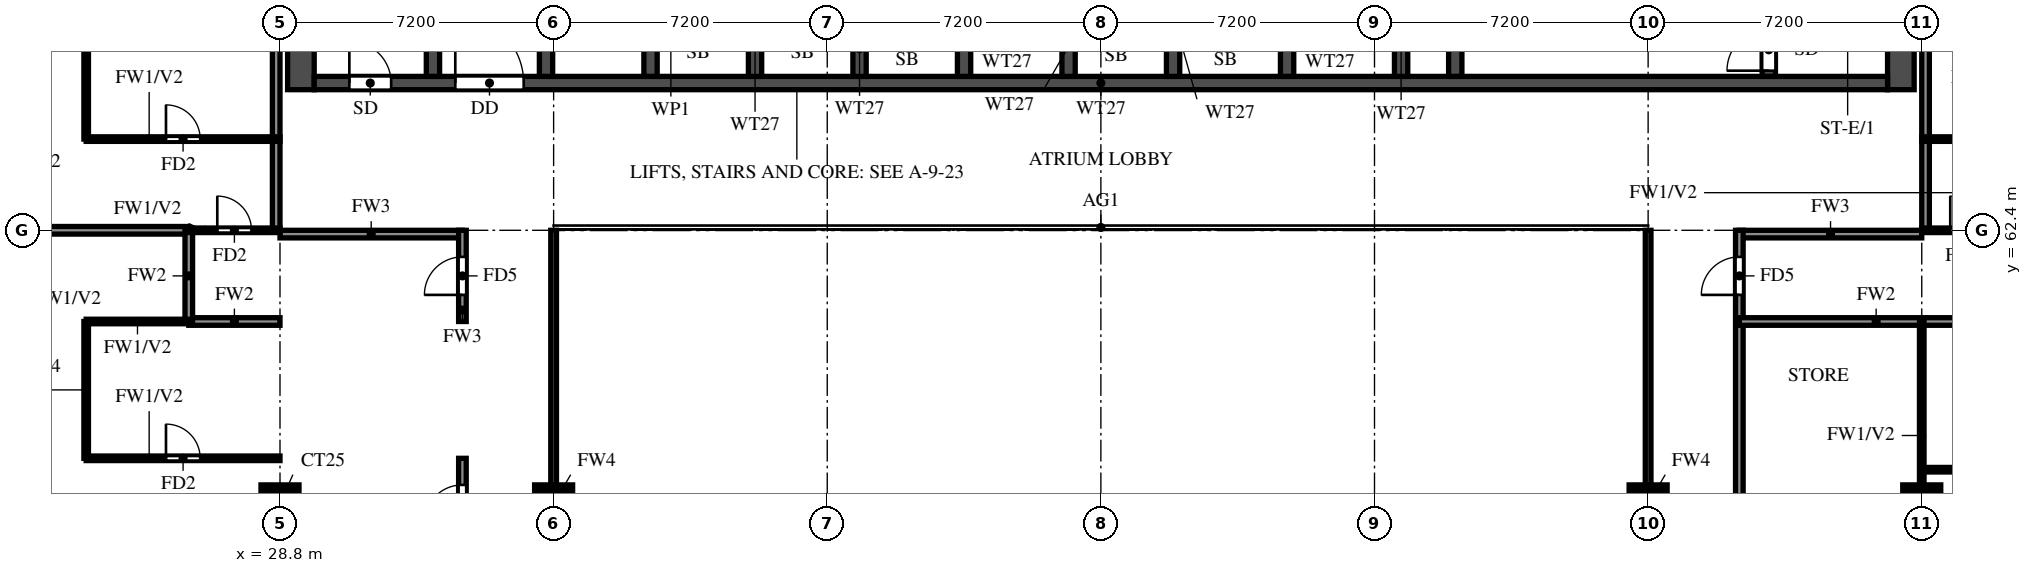
"""IFC4 building model, lengths in metres.
Left out: names, types, materials, properties, quantities, classifications, styles, units other than length and angle.
Written with IfcOpenShell. Run it as: python <this file> out.ifc"""

import sys

from ifc_helpers import new_model, si_unit, direction, frame, frame_2d, origin, origin_2d, place, context, subcontext, project, spatial, rectangle, extrude, source, transform, mapped, element, fill, save


model = new_model("IFC4")
c1 = context("Model", 3, precision=1e-05, world=origin(), true_north=direction((0.0, 1.0)))
c2 = subcontext(c1, "Body", "Model", "MODEL_VIEW")
j1 = project(units=[si_unit("LENGTHUNIT", "METRE"), si_unit("PLANEANGLEUNIT", "RADIAN")], contexts=[c1])
p1 = place(None, origin())
s1 = spatial("IfcSite", under=j1, at=p1, CompositionType="ELEMENT")
p2 = place(p1, origin())
s2 = spatial("IfcBuilding", under=s1, at=p2, CompositionType="ELEMENT")
p3 = place(p2, frame((0.0, 0.0, 167.5)))
s3 = spatial("IfcBuildingStorey", under=s2, at=p3, CompositionType="ELEMENT", Elevation=167.5)
m1 = source(origin(), c2, "Body", "SweptSolid", [
    extrude(rectangle(XDim=1.0, YDim=1.0, at=origin_2d()), origin(), (0.0, 0.0, 1.0), 3.2),
])
for number, where, z_axis, x_axis in (
    (1, (28.8, 55.2, 0.0), (0.0, 0.0, 1.0), (1.0, 0.0, 0.0)),
    (2, (36.0, 55.2, 0.0), (0.0, 0.0, 1.0), (1.0, 0.0, 0.0)),
    (3, (64.8, 55.2, 0.0), (0.0, 0.0, 1.0), (1.0, 0.0, 0.0)),
    (4, (72.0, 55.2, 0.0), (0.0, 0.0, 1.0), (1.0, 0.0, 0.0)),
):
    element("IfcColumn", number, at=place(p3, frame(where, z_axis=z_axis, x_axis=x_axis)), inside=s3, PredefinedType="COLUMN", context=c2, shape_type="MappedRepresentation", body=[
        mapped(m1, transform((0.0, 0.0, 0.0))),
    ])
for number, where, z_axis, x_axis in (
    (5, (29.35, 66.1, 0.0), (0.0, 0.0, 1.0), (0.0, 1.0, 0.0)),
    (6, (71.45, 66.1, 0.0), (0.0, 0.0, 1.0), (0.0, 1.0, 0.0)),
):
    element("IfcWall", number, at=place(p3, frame(where, z_axis=z_axis, x_axis=x_axis)), inside=s3, PredefinedType="SHEAR", context=c2, shape_type="SweptSolid", body=[
        extrude(rectangle(XDim=11.9, YDim=0.7, at=frame_2d((5.95, 0.0))), origin(), (0.0, 0.0, 1.0), 3.2),
    ])
p4 = place(p3, frame((29.7, 66.275, 0.0), z_axis=(0.0, 0.0, 1.0), x_axis=(1.0, 0.0, 0.0)))
e7 = element("IfcWall", 7, at=p4, inside=s3, PredefinedType="SHEAR", context=c2, shape_type="SweptSolid", body=[
    extrude(rectangle(XDim=41.4, YDim=0.35, at=frame_2d((20.7, 0.0))), origin(), (0.0, 0.0, 1.0), 3.2),
])
p5 = place(p4, frame((0.925, 0.0, 0.0)))
e8 = element("IfcOpeningElement", 8, at=p5, cuts=e7, PredefinedType="OPENING", context=c2, shape_type="SweptSolid", body=[
    extrude(rectangle(XDim=1.1, YDim=2.1, at=frame_2d((0.55, 1.05))), frame((0.0, 0.185, 0.0), z_axis=(0.0, -1.0, 0.0), x_axis=(1.0, 0.0, 0.0)), (0.0, 0.0, 1.0), 0.37),
])
p6 = place(p4, frame((3.712, 0.0, 0.0)))
e9 = element("IfcOpeningElement", 9, at=p6, cuts=e7, PredefinedType="OPENING", context=c2, shape_type="SweptSolid", body=[
    extrude(rectangle(XDim=1.8, YDim=2.1, at=frame_2d((0.9, 1.05))), frame((0.0, 0.185, 0.0), z_axis=(0.0, -1.0, 0.0), x_axis=(1.0, 0.0, 0.0)), (0.0, 0.0, 1.0), 0.37),
])
p7 = place(p3, frame((32.825, 66.45, 0.0), z_axis=(0.0, 0.0, 1.0), x_axis=(0.0, 1.0, 0.0)))
e10 = element("IfcWall", 10, at=p7, inside=s3, PredefinedType="SHEAR", context=c2, shape_type="SweptSolid", body=[
    extrude(rectangle(XDim=10.85, YDim=0.35, at=frame_2d((5.425, 0.0))), origin(), (0.0, 0.0, 1.0), 3.2),
])
p8 = place(p3, frame((67.975, 66.45, 0.0), z_axis=(0.0, 0.0, 1.0), x_axis=(0.0, 1.0, 0.0)))
e11 = element("IfcWall", 11, at=p8, inside=s3, PredefinedType="SHEAR", context=c2, shape_type="SweptSolid", body=[
    extrude(rectangle(XDim=10.85, YDim=0.35, at=frame_2d((5.425, 0.0))), origin(), (0.0, 0.0, 1.0), 3.2),
])
p9 = place(p8, frame((0.15, 0.0, 0.0)))
e12 = element("IfcOpeningElement", 12, at=p9, cuts=e11, PredefinedType="OPENING", context=c2, shape_type="SweptSolid", body=[
    extrude(rectangle(XDim=1.1, YDim=2.1, at=frame_2d((0.55, 1.05))), frame((0.0, 0.185, 0.0), z_axis=(0.0, -1.0, 0.0), x_axis=(1.0, 0.0, 0.0)), (0.0, 0.0, 1.0), 0.37),
])
p10 = place(p3, frame((59.725, 66.45, 0.0), z_axis=(0.0, 0.0, 1.0), x_axis=(0.0, 1.0, 0.0)))
e13 = element("IfcWall", 13, at=p10, inside=s3, PredefinedType="SHEAR", context=c2, shape_type="SweptSolid", body=[
    extrude(rectangle(XDim=6.125, YDim=0.35, at=frame_2d((3.062, 0.0))), origin(), (0.0, 0.0, 1.0), 3.2),
])
p11 = place(p10, frame((3.85, 0.0, 0.0)))
e14 = element("IfcOpeningElement", 14, at=p11, cuts=e13, PredefinedType="OPENING", context=c2, shape_type="SweptSolid", body=[
    extrude(rectangle(XDim=1.2, YDim=2.1, at=frame_2d((0.6, 1.05))), frame((0.0, 0.185, 0.0), z_axis=(0.0, -1.0, 0.0), x_axis=(1.0, 0.0, 0.0)), (0.0, 0.0, 1.0), 0.37),
])
for number, where, z_axis, x_axis in (
    (15, (35.8, 66.45, 0.0), (0.0, 0.0, 1.0), (0.0, 1.0, 0.0)),
    (16, (38.55, 66.45, 0.0), (0.0, 0.0, 1.0), (0.0, 1.0, 0.0)),
    (17, (41.3, 66.45, 0.0), (0.0, 0.0, 1.0), (0.0, 1.0, 0.0)),
    (18, (44.05, 66.45, 0.0), (0.0, 0.0, 1.0), (0.0, 1.0, 0.0)),
    (19, (46.8, 66.45, 0.0), (0.0, 0.0, 1.0), (0.0, 1.0, 0.0)),
    (20, (49.55, 66.45, 0.0), (0.0, 0.0, 1.0), (0.0, 1.0, 0.0)),
    (21, (52.3, 66.45, 0.0), (0.0, 0.0, 1.0), (0.0, 1.0, 0.0)),
    (22, (55.3, 66.45, 0.0), (0.0, 0.0, 1.0), (0.0, 1.0, 0.0)),
    (23, (58.3, 66.45, 0.0), (0.0, 0.0, 1.0), (0.0, 1.0, 0.0)),
):
    element("IfcWall", number, at=place(p3, frame(where, z_axis=z_axis, x_axis=x_axis)), inside=s3, PredefinedType="SHEAR", context=c2, shape_type="SweptSolid", body=[
        extrude(rectangle(XDim=2.425, YDim=0.35, at=frame_2d((1.212, 0.0))), origin(), (0.0, 0.0, 1.0), 3.2),
    ])
for number, where, z_axis, x_axis in (
    (24, (28.8, 62.3, 0.0), (0.0, 0.0, 1.0), (1.0, 0.0, 0.0)),
    (25, (67.2, 62.3, 0.0), (0.0, 0.0, 1.0), (1.0, 0.0, 0.0)),
):
    element("IfcWall", number, at=place(p3, frame(where, z_axis=z_axis, x_axis=x_axis)), inside=s3, PredefinedType="SOLIDWALL", context=c2, shape_type="SweptSolid", body=[
        extrude(rectangle(XDim=4.8, YDim=0.2, at=frame_2d((2.4, 0.0))), origin(), (0.0, 0.0, 1.0), 3.2),
    ])
p12 = place(p3, frame((28.7, 62.4, 0.0), z_axis=(0.0, 0.0, 1.0), x_axis=(0.0, 1.0, 0.0)))
e26 = element("IfcWall", 26, at=p12, inside=s3, PredefinedType="SOLIDWALL", context=c2, shape_type="SweptSolid", body=[
    extrude(rectangle(XDim=15.6, YDim=0.2, at=frame_2d((7.8, 0.0))), origin(), (0.0, 0.0, 1.0), 3.2),
])
p13 = place(p3, frame((33.6, 45.6, 0.0), z_axis=(0.0, 0.0, 1.0), x_axis=(0.0, 1.0, 0.0)))
e27 = element("IfcWall", 27, at=p13, inside=s3, PredefinedType="SOLIDWALL", context=c2, shape_type="SweptSolid", body=[
    extrude(rectangle(XDim=10.8, YDim=0.2, at=frame_2d((5.4, 0.0))), origin(), (0.0, 0.0, 1.0), 3.2),
])
p14 = place(p13, frame((0.7, 0.0, 0.0)))
e28 = element("IfcOpeningElement", 28, at=p14, cuts=e27, PredefinedType="OPENING", context=c2, shape_type="SweptSolid", body=[
    extrude(rectangle(XDim=1.0, YDim=2.1, at=frame_2d((0.5, 1.05))), frame((0.0, 0.11, 0.0), z_axis=(0.0, -1.0, 0.0), x_axis=(1.0, 0.0, 0.0)), (0.0, 0.0, 1.0), 0.22),
])
p15 = place(p13, frame((9.1, 0.0, 0.0)))
e29 = element("IfcOpeningElement", 29, at=p15, cuts=e27, PredefinedType="OPENING", context=c2, shape_type="SweptSolid", body=[
    extrude(rectangle(XDim=1.0, YDim=2.1, at=frame_2d((0.5, 1.05))), frame((0.0, 0.11, 0.0), z_axis=(0.0, -1.0, 0.0), x_axis=(1.0, 0.0, 0.0)), (0.0, 0.0, 1.0), 0.22),
])
p16 = place(p3, frame((33.6, 60.0, 0.0), z_axis=(0.0, 0.0, 1.0), x_axis=(0.0, 1.0, 0.0)))
e30 = element("IfcWall", 30, at=p16, inside=s3, PredefinedType="SOLIDWALL", context=c2, shape_type="SweptSolid", body=[
    extrude(rectangle(XDim=2.4, YDim=0.2, at=frame_2d((1.2, 0.0))), origin(), (0.0, 0.0, 1.0), 3.2),
])
p17 = place(p16, frame((0.7, 0.0, 0.0)))
e31 = element("IfcOpeningElement", 31, at=p17, cuts=e30, PredefinedType="OPENING", context=c2, shape_type="SweptSolid", body=[
    extrude(rectangle(XDim=1.0, YDim=2.1, at=frame_2d((0.5, 1.05))), frame((0.0, 0.11, 0.0), z_axis=(0.0, -1.0, 0.0), x_axis=(1.0, 0.0, 0.0)), (0.0, 0.0, 1.0), 0.22),
])
p18 = place(p3, frame((67.2, 45.6, 0.0), z_axis=(0.0, 0.0, 1.0), x_axis=(0.0, 1.0, 0.0)))
e32 = element("IfcWall", 32, at=p18, inside=s3, PredefinedType="SOLIDWALL", context=c2, shape_type="SweptSolid", body=[
    extrude(rectangle(XDim=16.8, YDim=0.2, at=frame_2d((8.4, 0.0))), origin(), (0.0, 0.0, 1.0), 3.2),
])
p19 = place(p18, frame((6.7, 0.0, 0.0)))
e33 = element("IfcOpeningElement", 33, at=p19, cuts=e32, PredefinedType="OPENING", context=c2, shape_type="SweptSolid", body=[
    extrude(rectangle(XDim=1.0, YDim=2.1, at=frame_2d((0.5, 1.05))), frame((0.0, 0.11, 0.0), z_axis=(0.0, -1.0, 0.0), x_axis=(1.0, 0.0, 0.0)), (0.0, 0.0, 1.0), 0.22),
])
p20 = place(p18, frame((15.1, 0.0, 0.0)))
e34 = element("IfcOpeningElement", 34, at=p20, cuts=e32, PredefinedType="OPENING", context=c2, shape_type="SweptSolid", body=[
    extrude(rectangle(XDim=1.0, YDim=2.1, at=frame_2d((0.5, 1.05))), frame((0.0, 0.11, 0.0), z_axis=(0.0, -1.0, 0.0), x_axis=(1.0, 0.0, 0.0)), (0.0, 0.0, 1.0), 0.22),
])
p21 = place(p18, frame((0.7, 0.0, 0.0)))
e35 = element("IfcOpeningElement", 35, at=p21, cuts=e32, PredefinedType="OPENING", context=c2, shape_type="SweptSolid", body=[
    extrude(rectangle(XDim=1.0, YDim=2.1, at=frame_2d((0.5, 1.05))), frame((0.0, 0.11, 0.0), z_axis=(0.0, -1.0, 0.0), x_axis=(1.0, 0.0, 0.0)), (0.0, 0.0, 1.0), 0.22),
])
p22 = place(p3, frame((72.1, 62.4, 0.0), z_axis=(0.0, 0.0, 1.0), x_axis=(0.0, 1.0, 0.0)))
e36 = element("IfcWall", 36, at=p22, inside=s3, PredefinedType="SOLIDWALL", context=c2, shape_type="SweptSolid", body=[
    extrude(rectangle(XDim=15.6, YDim=0.2, at=frame_2d((7.8, 0.0))), origin(), (0.0, 0.0, 1.0), 3.2),
])
p23 = place(p3, frame((26.4, 60.0, 0.0), z_axis=(0.0, 0.0, 1.0), x_axis=(1.0, 0.0, 0.0)))
e37 = element("IfcWall", 37, at=p23, inside=s3, PredefinedType="SOLIDWALL", context=c2, shape_type="SweptSolid", body=[
    extrude(rectangle(XDim=2.4, YDim=0.2, at=frame_2d((1.2, 0.0))), origin(), (0.0, 0.0, 1.0), 3.2),
])
p24 = place(p3, frame((67.2, 60.0, 0.0), z_axis=(0.0, 0.0, 1.0), x_axis=(1.0, 0.0, 0.0)))
e38 = element("IfcWall", 38, at=p24, inside=s3, PredefinedType="SOLIDWALL", context=c2, shape_type="SweptSolid", body=[
    extrude(rectangle(XDim=7.2, YDim=0.2, at=frame_2d((3.6, 0.0))), origin(), (0.0, 0.0, 1.0), 3.2),
])
p25 = place(p3, frame((14.525, 62.4, 0.0), z_axis=(0.0, 0.0, 1.0), x_axis=(1.0, 0.0, 0.0)))
e39 = element("IfcWall", 39, at=p25, inside=s3, PredefinedType="SOLIDWALL", context=c2, shape_type="SweptSolid", body=[
    extrude(rectangle(XDim=11.875, YDim=0.2, at=frame_2d((5.938, 0.0))), origin(), (0.0, 0.0, 1.0), 3.2),
])
p26 = place(p3, frame((26.4, 60.0, 0.0), z_axis=(0.0, 0.0, 1.0), x_axis=(0.0, 1.0, 0.0)))
e40 = element("IfcWall", 40, at=p26, inside=s3, PredefinedType="SOLIDWALL", context=c2, shape_type="SweptSolid", body=[
    extrude(rectangle(XDim=2.4, YDim=0.2, at=frame_2d((1.2, 0.0))), origin(), (0.0, 0.0, 1.0), 3.2),
])
p27 = place(p3, frame((72.0, 56.1, 0.0), z_axis=(0.0, 0.0, 1.0), x_axis=(1.0, 0.0, 0.0)))
e41 = element("IfcWall", 41, at=p27, inside=s3, PredefinedType="PARTITIONING", context=c2, shape_type="SweptSolid", body=[
    extrude(rectangle(XDim=5.1, YDim=0.12, at=frame_2d((2.55, 0.0))), origin(), (0.0, 0.0, 1.0), 3.2),
])
p28 = place(p3, frame((23.7, 56.4, 0.0), z_axis=(0.0, 0.0, 1.0), x_axis=(1.0, 0.0, 0.0)))
e42 = element("IfcWall", 42, at=p28, inside=s3, PredefinedType="PARTITIONING", context=c2, shape_type="SweptSolid", body=[
    extrude(rectangle(XDim=5.1, YDim=0.12, at=frame_2d((2.55, 0.0))), origin(), (0.0, 0.0, 1.0), 3.2),
])
p29 = place(p28, frame((2.1, 0.0, 0.0)))
e43 = element("IfcOpeningElement", 43, at=p29, cuts=e42, PredefinedType="OPENING", context=c2, shape_type="SweptSolid", body=[
    extrude(rectangle(XDim=0.9, YDim=2.1, at=frame_2d((0.45, 1.05))), frame((0.0, 0.07, 0.0), z_axis=(0.0, -1.0, 0.0), x_axis=(1.0, 0.0, 0.0)), (0.0, 0.0, 1.0), 0.14),
])
p30 = place(p3, frame((23.7, 60.0, 0.0), z_axis=(0.0, 0.0, 1.0), x_axis=(1.0, 0.0, 0.0)))
e44 = element("IfcWall", 44, at=p30, inside=s3, PredefinedType="PARTITIONING", context=c2, shape_type="SweptSolid", body=[
    extrude(rectangle(XDim=2.7, YDim=0.12, at=frame_2d((1.35, 0.0))), origin(), (0.0, 0.0, 1.0), 3.2),
])
p31 = place(p3, frame((26.4, 62.4, 0.0), z_axis=(0.0, 0.0, 1.0), x_axis=(1.0, 0.0, 0.0)))
e45 = element("IfcWall", 45, at=p31, inside=s3, PredefinedType="PARTITIONING", context=c2, shape_type="SweptSolid", body=[
    extrude(rectangle(XDim=2.4, YDim=0.12, at=frame_2d((1.2, 0.0))), origin(), (0.0, 0.0, 1.0), 3.2),
])
p32 = place(p31, frame((0.75, 0.0, 0.0)))
e46 = element("IfcOpeningElement", 46, at=p32, cuts=e45, PredefinedType="OPENING", context=c2, shape_type="SweptSolid", body=[
    extrude(rectangle(XDim=0.9, YDim=2.1, at=frame_2d((0.45, 1.05))), frame((0.0, 0.07, 0.0), z_axis=(0.0, -1.0, 0.0), x_axis=(1.0, 0.0, 0.0)), (0.0, 0.0, 1.0), 0.14),
])
p33 = place(p3, frame((72.0, 62.4, 0.0), z_axis=(0.0, 0.0, 1.0), x_axis=(1.0, 0.0, 0.0)))
e47 = element("IfcWall", 47, at=p33, inside=s3, PredefinedType="PARTITIONING", context=c2, shape_type="SweptSolid", body=[
    extrude(rectangle(XDim=2.4, YDim=0.12, at=frame_2d((1.2, 0.0))), origin(), (0.0, 0.0, 1.0), 3.2),
])
p34 = place(p33, frame((0.75, 0.0, 0.0)))
e48 = element("IfcOpeningElement", 48, at=p34, cuts=e47, PredefinedType="OPENING", context=c2, shape_type="SweptSolid", body=[
    extrude(rectangle(XDim=0.9, YDim=2.1, at=frame_2d((0.45, 1.05))), frame((0.0, 0.07, 0.0), z_axis=(0.0, -1.0, 0.0), x_axis=(1.0, 0.0, 0.0)), (0.0, 0.0, 1.0), 0.14),
])
p35 = place(p3, frame((23.7, 64.8, 0.0), z_axis=(0.0, 0.0, 1.0), x_axis=(1.0, 0.0, 0.0)))
e49 = element("IfcWall", 49, at=p35, inside=s3, PredefinedType="PARTITIONING", context=c2, shape_type="SweptSolid", body=[
    extrude(rectangle(XDim=5.1, YDim=0.12, at=frame_2d((2.55, 0.0))), origin(), (0.0, 0.0, 1.0), 3.2),
])
p36 = place(p35, frame((2.1, 0.0, 0.0)))
e50 = element("IfcOpeningElement", 50, at=p36, cuts=e49, PredefinedType="OPENING", context=c2, shape_type="SweptSolid", body=[
    extrude(rectangle(XDim=0.9, YDim=2.1, at=frame_2d((0.45, 1.05))), frame((0.0, 0.07, 0.0), z_axis=(0.0, -1.0, 0.0), x_axis=(1.0, 0.0, 0.0)), (0.0, 0.0, 1.0), 0.14),
])
p37 = place(p3, frame((72.0, 64.8, 0.0), z_axis=(0.0, 0.0, 1.0), x_axis=(1.0, 0.0, 0.0)))
e51 = element("IfcWall", 51, at=p37, inside=s3, PredefinedType="PARTITIONING", context=c2, shape_type="SweptSolid", body=[
    extrude(rectangle(XDim=5.1, YDim=0.12, at=frame_2d((2.55, 0.0))), origin(), (0.0, 0.0, 1.0), 3.2),
])
p38 = place(p37, frame((2.1, 0.0, 0.0)))
e52 = element("IfcOpeningElement", 52, at=p38, cuts=e51, PredefinedType="OPENING", context=c2, shape_type="SweptSolid", body=[
    extrude(rectangle(XDim=0.9, YDim=2.1, at=frame_2d((0.45, 1.05))), frame((0.0, 0.07, 0.0), z_axis=(0.0, -1.0, 0.0), x_axis=(1.0, 0.0, 0.0)), (0.0, 0.0, 1.0), 0.14),
])
p39 = place(p3, frame((23.7, 56.4, 0.0), z_axis=(0.0, 0.0, 1.0), x_axis=(0.0, 1.0, 0.0)))
e53 = element("IfcWall", 53, at=p39, inside=s3, PredefinedType="PARTITIONING", context=c2, shape_type="SweptSolid", body=[
    extrude(rectangle(XDim=3.6, YDim=0.12, at=frame_2d((1.8, 0.0))), origin(), (0.0, 0.0, 1.0), 3.2),
])
p40 = place(p3, frame((23.7, 64.8, 0.0), z_axis=(0.0, 0.0, 1.0), x_axis=(0.0, 1.0, 0.0)))
e54 = element("IfcWall", 54, at=p40, inside=s3, PredefinedType="PARTITIONING", context=c2, shape_type="SweptSolid", body=[
    extrude(rectangle(XDim=8.4, YDim=0.12, at=frame_2d((4.2, 0.0))), origin(), (0.0, 0.0, 1.0), 3.2),
])
p41 = place(p40, frame((6.125, 0.0, 0.0)))
e55 = element("IfcOpeningElement", 55, at=p41, cuts=e54, PredefinedType="OPENING", context=c2, shape_type="SweptSolid", body=[
    extrude(rectangle(XDim=0.8, YDim=2.1, at=frame_2d((0.4, 1.05))), frame((0.0, 0.07, 0.0), z_axis=(0.0, -1.0, 0.0), x_axis=(1.0, 0.0, 0.0)), (0.0, 0.0, 1.0), 0.14),
])
p42 = place(p3, frame((72.0, 54.0, 0.0), z_axis=(0.0, 0.0, 1.0), x_axis=(0.0, 1.0, 0.0)))
e56 = element("IfcWall", 56, at=p42, inside=s3, PredefinedType="PARTITIONING", context=c2, shape_type="SweptSolid", body=[
    extrude(rectangle(XDim=6.0, YDim=0.12, at=frame_2d((3.0, 0.0))), origin(), (0.0, 0.0, 1.0), 3.2),
])
for number, where, z_axis, x_axis in (
    (57, (36.0, 48.0, 0.0), (0.0, 0.0, 1.0), (0.0, 1.0, 0.0)),
    (58, (64.8, 48.0, 0.0), (0.0, 0.0, 1.0), (0.0, 1.0, 0.0)),
):
    element("IfcWall", number, at=place(p3, frame(where, z_axis=z_axis, x_axis=x_axis)), inside=s3, PredefinedType="SOLIDWALL", context=c2, shape_type="SweptSolid", body=[
        extrude(rectangle(XDim=14.4, YDim=0.15, at=frame_2d((7.2, 0.0))), origin(), (0.0, 0.0, 1.0), 2.3),
    ])
p43 = place(p5, origin())
e59 = element("IfcDoor", 59, at=p43, inside=s3, OperationType="SINGLE_SWING_LEFT", PredefinedType="DOOR", context=c2, shape_type="SweptSolid", body=[
    extrude(rectangle(XDim=1.1, YDim=2.1, at=frame_2d((0.55, 1.05))), frame((0.0, 0.025, 0.0), z_axis=(0.0, -1.0, 0.0), x_axis=(1.0, 0.0, 0.0)), (0.0, 0.0, 1.0), 0.05),
])
fill(e8, e59)
p44 = place(p9, origin())
e60 = element("IfcDoor", 60, at=p44, inside=s3, OperationType="SINGLE_SWING_LEFT", PredefinedType="DOOR", context=c2, shape_type="SweptSolid", body=[
    extrude(rectangle(XDim=1.1, YDim=2.1, at=frame_2d((0.55, 1.05))), frame((0.0, 0.025, 0.0), z_axis=(0.0, -1.0, 0.0), x_axis=(1.0, 0.0, 0.0)), (0.0, 0.0, 1.0), 0.05),
])
fill(e12, e60)
p45 = place(p6, origin())
e61 = element("IfcDoor", 61, at=p45, inside=s3, OperationType="DOUBLE_DOOR_SINGLE_SWING", PredefinedType="DOOR", context=c2, shape_type="SweptSolid", body=[
    extrude(rectangle(XDim=1.8, YDim=2.1, at=frame_2d((0.9, 1.05))), frame((0.0, 0.025, 0.0), z_axis=(0.0, -1.0, 0.0), x_axis=(1.0, 0.0, 0.0)), (0.0, 0.0, 1.0), 0.05),
])
fill(e9, e61)
p46 = place(p15, origin())
e62 = element("IfcDoor", 62, at=p46, inside=s3, OperationType="SINGLE_SWING_RIGHT", PredefinedType="DOOR", context=c2, shape_type="SweptSolid", body=[
    extrude(rectangle(XDim=1.0, YDim=2.1, at=frame_2d((0.5, 1.05))), frame((0.0, 0.025, 0.0), z_axis=(0.0, -1.0, 0.0), x_axis=(1.0, 0.0, 0.0)), (0.0, 0.0, 1.0), 0.05),
])
fill(e29, e62)
p47 = place(p29, origin())
e63 = element("IfcDoor", 63, at=p47, inside=s3, OperationType="SINGLE_SWING_RIGHT", PredefinedType="DOOR", context=c2, shape_type="SweptSolid", body=[
    extrude(rectangle(XDim=0.9, YDim=2.1, at=frame_2d((0.45, 1.05))), frame((0.0, 0.025, 0.0), z_axis=(0.0, -1.0, 0.0), x_axis=(1.0, 0.0, 0.0)), (0.0, 0.0, 1.0), 0.05),
])
fill(e43, e63)
p48 = place(p32, origin())
e64 = element("IfcDoor", 64, at=p48, inside=s3, OperationType="SINGLE_SWING_LEFT", PredefinedType="DOOR", context=c2, shape_type="SweptSolid", body=[
    extrude(rectangle(XDim=0.9, YDim=2.1, at=frame_2d((0.45, 1.05))), frame((0.0, 0.025, 0.0), z_axis=(0.0, -1.0, 0.0), x_axis=(1.0, 0.0, 0.0)), (0.0, 0.0, 1.0), 0.05),
])
fill(e46, e64)
p49 = place(p17, origin())
e65 = element("IfcDoor", 65, at=p49, inside=s3, OperationType="SINGLE_SWING_RIGHT", PredefinedType="DOOR", context=c2, shape_type="SweptSolid", body=[
    extrude(rectangle(XDim=1.0, YDim=2.1, at=frame_2d((0.5, 1.05))), frame((0.0, 0.025, 0.0), z_axis=(0.0, -1.0, 0.0), x_axis=(1.0, 0.0, 0.0)), (0.0, 0.0, 1.0), 0.05),
])
fill(e31, e65)
p50 = place(p36, origin())
e66 = element("IfcDoor", 66, at=p50, inside=s3, OperationType="SINGLE_SWING_LEFT", PredefinedType="DOOR", context=c2, shape_type="SweptSolid", body=[
    extrude(rectangle(XDim=0.9, YDim=2.1, at=frame_2d((0.45, 1.05))), frame((0.0, 0.025, 0.0), z_axis=(0.0, -1.0, 0.0), x_axis=(1.0, 0.0, 0.0)), (0.0, 0.0, 1.0), 0.05),
])
fill(e50, e66)
p51 = place(p34, origin())
e67 = element("IfcDoor", 67, at=p51, inside=s3, OperationType="SINGLE_SWING_LEFT", PredefinedType="DOOR", context=c2, shape_type="SweptSolid", body=[
    extrude(rectangle(XDim=0.9, YDim=2.1, at=frame_2d((0.45, 1.05))), frame((0.0, 0.025, 0.0), z_axis=(0.0, -1.0, 0.0), x_axis=(1.0, 0.0, 0.0)), (0.0, 0.0, 1.0), 0.05),
])
fill(e48, e67)
p52 = place(p20, origin())
e68 = element("IfcDoor", 68, at=p52, inside=s3, OperationType="SINGLE_SWING_LEFT", PredefinedType="DOOR", context=c2, shape_type="SweptSolid", body=[
    extrude(rectangle(XDim=1.0, YDim=2.1, at=frame_2d((0.5, 1.05))), frame((0.0, 0.025, 0.0), z_axis=(0.0, -1.0, 0.0), x_axis=(1.0, 0.0, 0.0)), (0.0, 0.0, 1.0), 0.05),
])
fill(e34, e68)
save(model, sys.argv[1])
